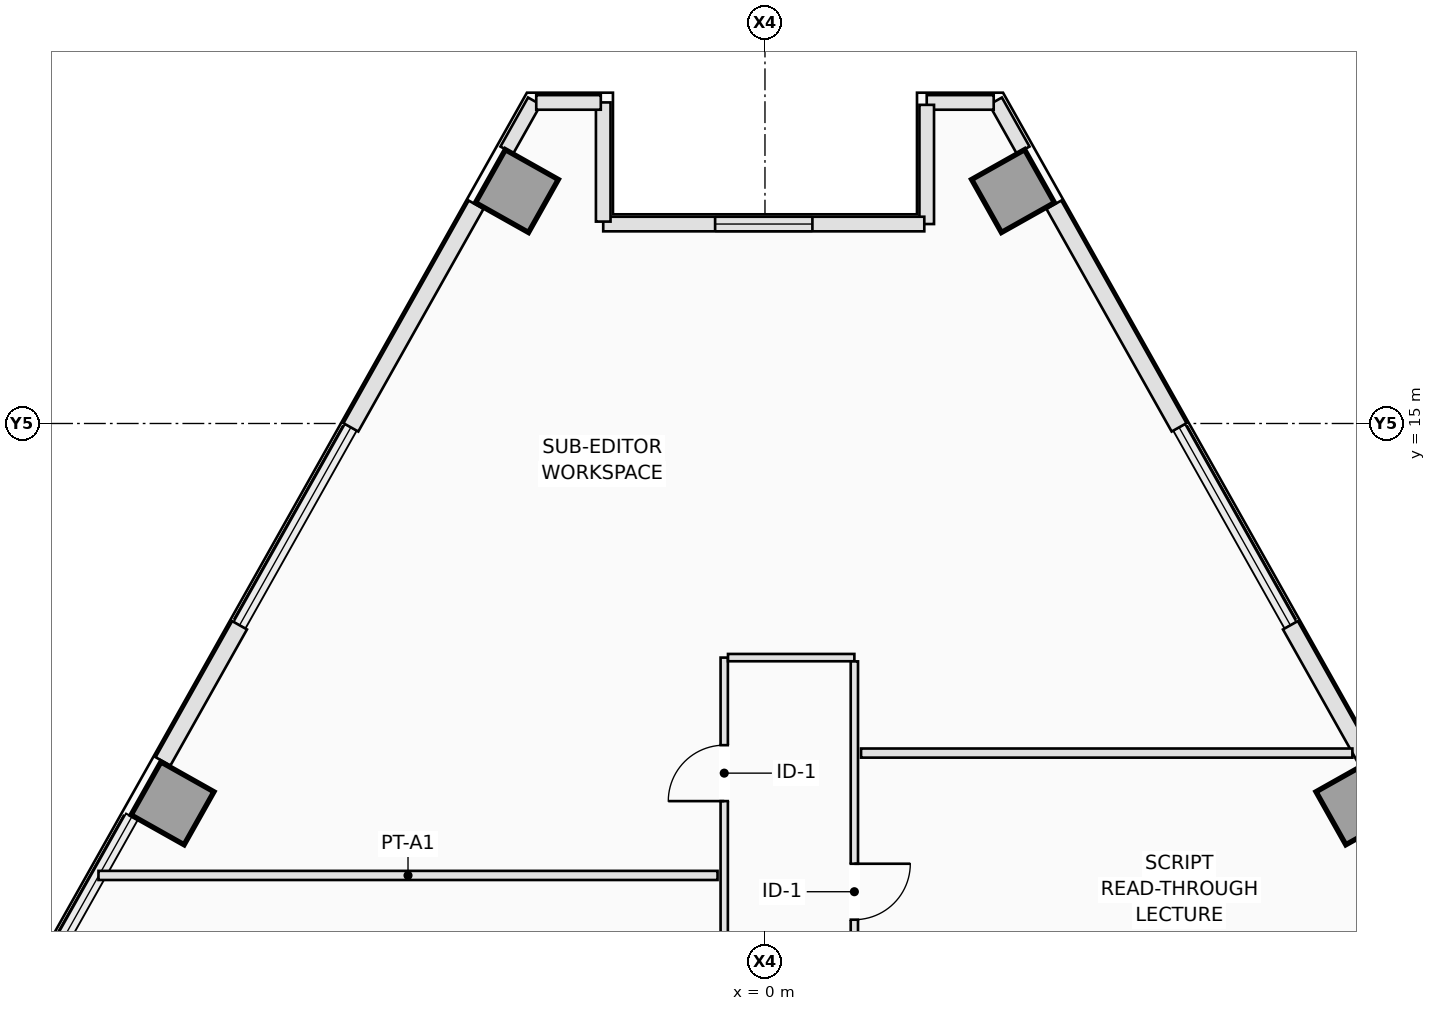
"""IFC4 building model, lengths in metres.
Left out: names, types, materials, properties, quantities, classifications, styles, units other than length and angle.
Written with IfcOpenShell. Run it as: python <this file> out.ifc"""

import sys

from ifc_helpers import new_model, si_unit, direction, frame, frame_2d, origin, origin_2d, place, context, subcontext, project, spatial, rectangle, extrude, element, fill, save


model = new_model("IFC4")
c1 = context("Model", 3, precision=1e-05, world=origin(), true_north=direction((0.0, 1.0)))
c2 = subcontext(c1, "Body", "Model", "MODEL_VIEW")
j1 = project(units=[si_unit("LENGTHUNIT", "METRE"), si_unit("PLANEANGLEUNIT", "RADIAN")], contexts=[c1])
p1 = place(None, origin())
s1 = spatial("IfcSite", under=j1, at=p1, CompositionType="ELEMENT")
p2 = place(p1, origin())
s2 = spatial("IfcBuilding", under=s1, at=p2, CompositionType="ELEMENT")
p3 = place(p2, frame((0.0, 0.0, 133.5)))
s3 = spatial("IfcBuildingStorey", under=s2, at=p3, CompositionType="ELEMENT", Elevation=133.5)
for number, where, z_axis, x_axis in (
    (1, (9.743, 8.753, 0.0), (0.0, 0.0, 1.0), (0.872, 0.49, 0.0)),
    (2, (4.079, 18.822, 0.0), (0.0, 0.0, 1.0), (0.872, 0.49, 0.0)),
    (3, (-4.079, 18.822, 0.0), (0.0, 0.0, 1.0), (-0.872, 0.49, 0.0)),
    (4, (-9.743, 8.753, 0.0), (0.0, 0.0, 1.0), (-0.872, 0.49, 0.0)),
):
    element("IfcColumn", number, at=place(p3, frame(where, z_axis=z_axis, x_axis=x_axis)), inside=s3, PredefinedType="COLUMN", context=c2, shape_type="SweptSolid", body=[
        extrude(rectangle(XDim=1.0, YDim=1.0, at=origin_2d()), origin(), (0.0, 0.0, 1.0), 3.5),
    ])
p4 = place(p3, frame((3.792, 20.302, 0.0), z_axis=(0.0, 0.0, 1.0), x_axis=(0.490048346303, -0.871695255399, 0.0)))
e5 = element("IfcWall", 5, at=p4, inside=s3, PredefinedType="STANDARD", context=c2, shape_type="SweptSolid", body=[
    extrude(rectangle(XDim=0.926, YDim=0.24, at=frame_2d((0.463, 0.0))), origin(), (0.0, 0.0, 1.0), 3.25),
])
p5 = place(p3, frame((4.751, 18.597, 0.0), z_axis=(0.0, 0.0, 1.0), x_axis=(0.490250201787, -0.871581745821, 0.0)))
e6 = element("IfcWall", 6, at=p5, inside=s3, PredefinedType="STANDARD", context=c2, shape_type="SweptSolid", body=[
    extrude(rectangle(XDim=4.201, YDim=0.28, at=frame_2d((2.1, 0.0))), origin(), (0.0, 0.0, 1.0), 3.25),
])
p6 = place(p3, frame((8.641, 11.682, 0.0), z_axis=(0.0, 0.0, 1.0), x_axis=(0.490301864627, -0.871552684319, 0.0)))
e7 = element("IfcWall", 7, at=p6, inside=s3, PredefinedType="STANDARD", context=c2, shape_type="SweptSolid", body=[
    extrude(rectangle(XDim=2.568, YDim=0.28, at=frame_2d((1.284, 0.0))), origin(), (0.0, 0.0, 1.0), 3.25),
])
p7 = place(p3, frame((-4.246, 19.495, 0.0), z_axis=(0.0, 0.0, 1.0), x_axis=(0.490048346303, 0.871695255399, 0.0)))
e8 = element("IfcWall", 8, at=p7, inside=s3, PredefinedType="STANDARD", context=c2, shape_type="SweptSolid", body=[
    extrude(rectangle(XDim=0.926, YDim=0.24, at=frame_2d((0.463, 0.0))), origin(), (0.0, 0.0, 1.0), 3.25),
])
p8 = place(p3, frame((-9.9, 9.444, 0.0), z_axis=(0.0, 0.0, 1.0), x_axis=(0.490301864627, 0.871552684319, 0.0)))
e9 = element("IfcWall", 9, at=p8, inside=s3, PredefinedType="STANDARD", context=c2, shape_type="SweptSolid", body=[
    extrude(rectangle(XDim=2.568, YDim=0.28, at=frame_2d((1.284, 0.0))), origin(), (0.0, 0.0, 1.0), 3.25),
])
p9 = place(p3, frame((-6.81, 14.936, 0.0), z_axis=(0.0, 0.0, 1.0), x_axis=(0.490250201787, 0.871581745821, 0.0)))
e10 = element("IfcWall", 10, at=p9, inside=s3, PredefinedType="STANDARD", context=c2, shape_type="SweptSolid", body=[
    extrude(rectangle(XDim=4.201, YDim=0.28, at=frame_2d((2.1, 0.0))), origin(), (0.0, 0.0, 1.0), 3.25),
])
p10 = place(p3, frame((3.761, 20.28, 0.0), z_axis=(0.0, 0.0, 1.0), x_axis=(-1.0, 0.0, 0.0)))
e11 = element("IfcWall", 11, at=p10, inside=s3, PredefinedType="STANDARD", context=c2, shape_type="SweptSolid", body=[
    extrude(rectangle(XDim=1.102, YDim=0.24, at=frame_2d((0.551, 0.0))), origin(), (0.0, 0.0, 1.0), 3.25),
])
p11 = place(p3, frame((2.66, 20.24, 0.0), z_axis=(0.0, 0.0, 1.0), x_axis=(0.0, -1.0, 0.0)))
e12 = element("IfcWall", 12, at=p11, inside=s3, PredefinedType="STANDARD", context=c2, shape_type="SweptSolid", body=[
    extrude(rectangle(XDim=1.96, YDim=0.24, at=frame_2d((0.98, 0.0))), origin(), (0.0, 0.0, 1.0), 3.25),
])
p12 = place(p3, frame((2.62, 18.28, 0.0), z_axis=(0.0, 0.0, 1.0), x_axis=(-1.0, 0.0, 0.0)))
e13 = element("IfcWall", 13, at=p12, inside=s3, PredefinedType="STANDARD", context=c2, shape_type="SweptSolid", body=[
    extrude(rectangle(XDim=5.28, YDim=0.24, at=frame_2d((2.64, 0.0))), origin(), (0.0, 0.0, 1.0), 3.25),
])
p13 = place(p12, frame((1.84, 0.0, 0.9)))
e14 = element("IfcOpeningElement", 14, at=p13, cuts=e13, PredefinedType="OPENING", context=c2, shape_type="SweptSolid", body=[
    extrude(rectangle(XDim=1.6, YDim=2.1, at=frame_2d((0.8, 1.05))), frame((0.0, 0.13, 0.0), z_axis=(0.0, -1.0, 0.0), x_axis=(1.0, 0.0, 0.0)), (0.0, 0.0, 1.0), 0.26),
])
p14 = place(p3, frame((-2.66, 18.32, 0.0), z_axis=(0.0, 0.0, 1.0), x_axis=(0.0, 1.0, 0.0)))
e15 = element("IfcWall", 15, at=p14, inside=s3, PredefinedType="STANDARD", context=c2, shape_type="SweptSolid", body=[
    extrude(rectangle(XDim=1.96, YDim=0.24, at=frame_2d((0.98, 0.0))), origin(), (0.0, 0.0, 1.0), 3.25),
])
p15 = place(p3, frame((-2.7, 20.28, 0.0), z_axis=(0.0, 0.0, 1.0), x_axis=(-1.0, 0.0, 0.0)))
e16 = element("IfcWall", 16, at=p15, inside=s3, PredefinedType="STANDARD", context=c2, shape_type="SweptSolid", body=[
    extrude(rectangle(XDim=1.062, YDim=0.24, at=frame_2d((0.531, 0.0))), origin(), (0.0, 0.0, 1.0), 3.25),
])
p16 = place(p3, frame((-0.67, -2.338, 0.0), z_axis=(0.0, 0.0, 1.0), x_axis=(0.0, 1.0, 0.0)))
e17 = element("IfcWall", 17, at=p16, inside=s3, PredefinedType="PARTITIONING", context=c2, shape_type="SweptSolid", body=[
    extrude(rectangle(XDim=13.488, YDim=0.12, at=frame_2d((6.744, 0.0))), origin(), (0.0, 0.0, 1.0), 3.25),
])
p17 = place(p16, frame((11.128, 0.0, 0.0)))
e18 = element("IfcOpeningElement", 18, at=p17, cuts=e17, PredefinedType="OPENING", context=c2, shape_type="SweptSolid", body=[
    extrude(rectangle(XDim=0.92, YDim=2.12, at=frame_2d((0.46, 1.06))), frame((0.0, 0.07, 0.0), z_axis=(0.0, -1.0, 0.0), x_axis=(1.0, 0.0, 0.0)), (0.0, 0.0, 1.0), 0.14),
])
p18 = place(p16, frame((7.834, 0.0, 0.0)))
e19 = element("IfcOpeningElement", 19, at=p18, cuts=e17, PredefinedType="OPENING", context=c2, shape_type="SweptSolid", body=[
    extrude(rectangle(XDim=0.92, YDim=2.12, at=frame_2d((0.46, 1.06))), frame((0.0, 0.07, 0.0), z_axis=(0.0, -1.0, 0.0), x_axis=(1.0, 0.0, 0.0)), (0.0, 0.0, 1.0), 0.14),
])
p19 = place(p16, frame((3.02, 0.0, 0.0)))
e20 = element("IfcOpeningElement", 20, at=p19, cuts=e17, PredefinedType="OPENING", context=c2, shape_type="SweptSolid", body=[
    extrude(rectangle(XDim=0.92, YDim=2.12, at=frame_2d((0.46, 1.06))), frame((0.0, 0.07, 0.0), z_axis=(0.0, -1.0, 0.0), x_axis=(1.0, 0.0, 0.0)), (0.0, 0.0, 1.0), 0.14),
])
p20 = place(p3, frame((-0.608, 11.15, 0.0), z_axis=(0.0, 0.0, 1.0), x_axis=(1.0, 0.0, 0.0)))
e21 = element("IfcWall", 21, at=p20, inside=s3, PredefinedType="PARTITIONING", context=c2, shape_type="SweptSolid", body=[
    extrude(rectangle(XDim=2.078, YDim=0.12, at=frame_2d((1.039, 0.0))), origin(), (0.0, 0.0, 1.0), 3.25),
])
p21 = place(p3, frame((1.47, 11.088, 0.0), z_axis=(0.0, 0.0, 1.0), x_axis=(0.0, -1.0, 0.0)))
e22 = element("IfcWall", 22, at=p21, inside=s3, PredefinedType="PARTITIONING", context=c2, shape_type="SweptSolid", body=[
    extrude(rectangle(XDim=13.488, YDim=0.12, at=frame_2d((6.744, 0.0))), origin(), (0.0, 0.0, 1.0), 3.25),
])
p22 = place(p21, frame((3.328, 0.0, 0.0)))
e23 = element("IfcOpeningElement", 23, at=p22, cuts=e22, PredefinedType="OPENING", context=c2, shape_type="SweptSolid", body=[
    extrude(rectangle(XDim=0.92, YDim=2.12, at=frame_2d((0.46, 1.06))), frame((0.0, 0.07, 0.0), z_axis=(0.0, -1.0, 0.0), x_axis=(1.0, 0.0, 0.0)), (0.0, 0.0, 1.0), 0.14),
])
p23 = place(p21, frame((7.678, 0.0, 0.0)))
e24 = element("IfcOpeningElement", 24, at=p23, cuts=e22, PredefinedType="OPENING", context=c2, shape_type="SweptSolid", body=[
    extrude(rectangle(XDim=0.92, YDim=2.12, at=frame_2d((0.46, 1.06))), frame((0.0, 0.07, 0.0), z_axis=(0.0, -1.0, 0.0), x_axis=(1.0, 0.0, 0.0)), (0.0, 0.0, 1.0), 0.14),
])
p24 = place(p3, frame((-0.78, 7.568, 0.0), z_axis=(0.0, 0.0, 1.0), x_axis=(-1.0, 0.0, 0.0)))
e25 = element("IfcWall", 25, at=p24, inside=s3, PredefinedType="PARTITIONING", context=c2, shape_type="SweptSolid", body=[
    extrude(rectangle(XDim=10.181, YDim=0.15, at=frame_2d((5.09, 0.0))), origin(), (0.0, 0.0, 1.0), 3.25),
])
p25 = place(p3, frame((9.66, 9.58, 0.0), z_axis=(0.0, 0.0, 1.0), x_axis=(-1.0, 0.0, 0.0)))
e26 = element("IfcWall", 26, at=p25, inside=s3, PredefinedType="PARTITIONING", context=c2, shape_type="SweptSolid", body=[
    extrude(rectangle(XDim=8.08, YDim=0.15, at=frame_2d((4.04, 0.0))), origin(), (0.0, 0.0, 1.0), 3.25),
])
p26 = place(p13, origin())
e27 = element("IfcWindow", 27, at=p26, inside=s3, PartitioningType="SINGLE_PANEL", PredefinedType="WINDOW", context=c2, shape_type="SweptSolid", body=[
    extrude(rectangle(XDim=1.6, YDim=2.1, at=frame_2d((0.8, 1.05))), frame((0.0, 0.03, 0.0), z_axis=(0.0, -1.0, 0.0), x_axis=(1.0, 0.0, 0.0)), (0.0, 0.0, 1.0), 0.06),
])
fill(e14, e27)
p27 = place(p17, origin())
e28 = element("IfcDoor", 28, at=p27, inside=s3, OperationType="SINGLE_SWING_LEFT", PredefinedType="DOOR", context=c2, shape_type="SweptSolid", body=[
    extrude(rectangle(XDim=0.92, YDim=2.12, at=frame_2d((0.46, 1.06))), frame((0.0, 0.025, 0.0), z_axis=(0.0, -1.0, 0.0), x_axis=(1.0, 0.0, 0.0)), (0.0, 0.0, 1.0), 0.05),
])
fill(e18, e28)
p28 = place(p22, origin())
e29 = element("IfcDoor", 29, at=p28, inside=s3, OperationType="SINGLE_SWING_LEFT", PredefinedType="DOOR", context=c2, shape_type="SweptSolid", body=[
    extrude(rectangle(XDim=0.92, YDim=2.12, at=frame_2d((0.46, 1.06))), frame((0.0, 0.025, 0.0), z_axis=(0.0, -1.0, 0.0), x_axis=(1.0, 0.0, 0.0)), (0.0, 0.0, 1.0), 0.05),
])
fill(e23, e29)
save(model, sys.argv[1])
